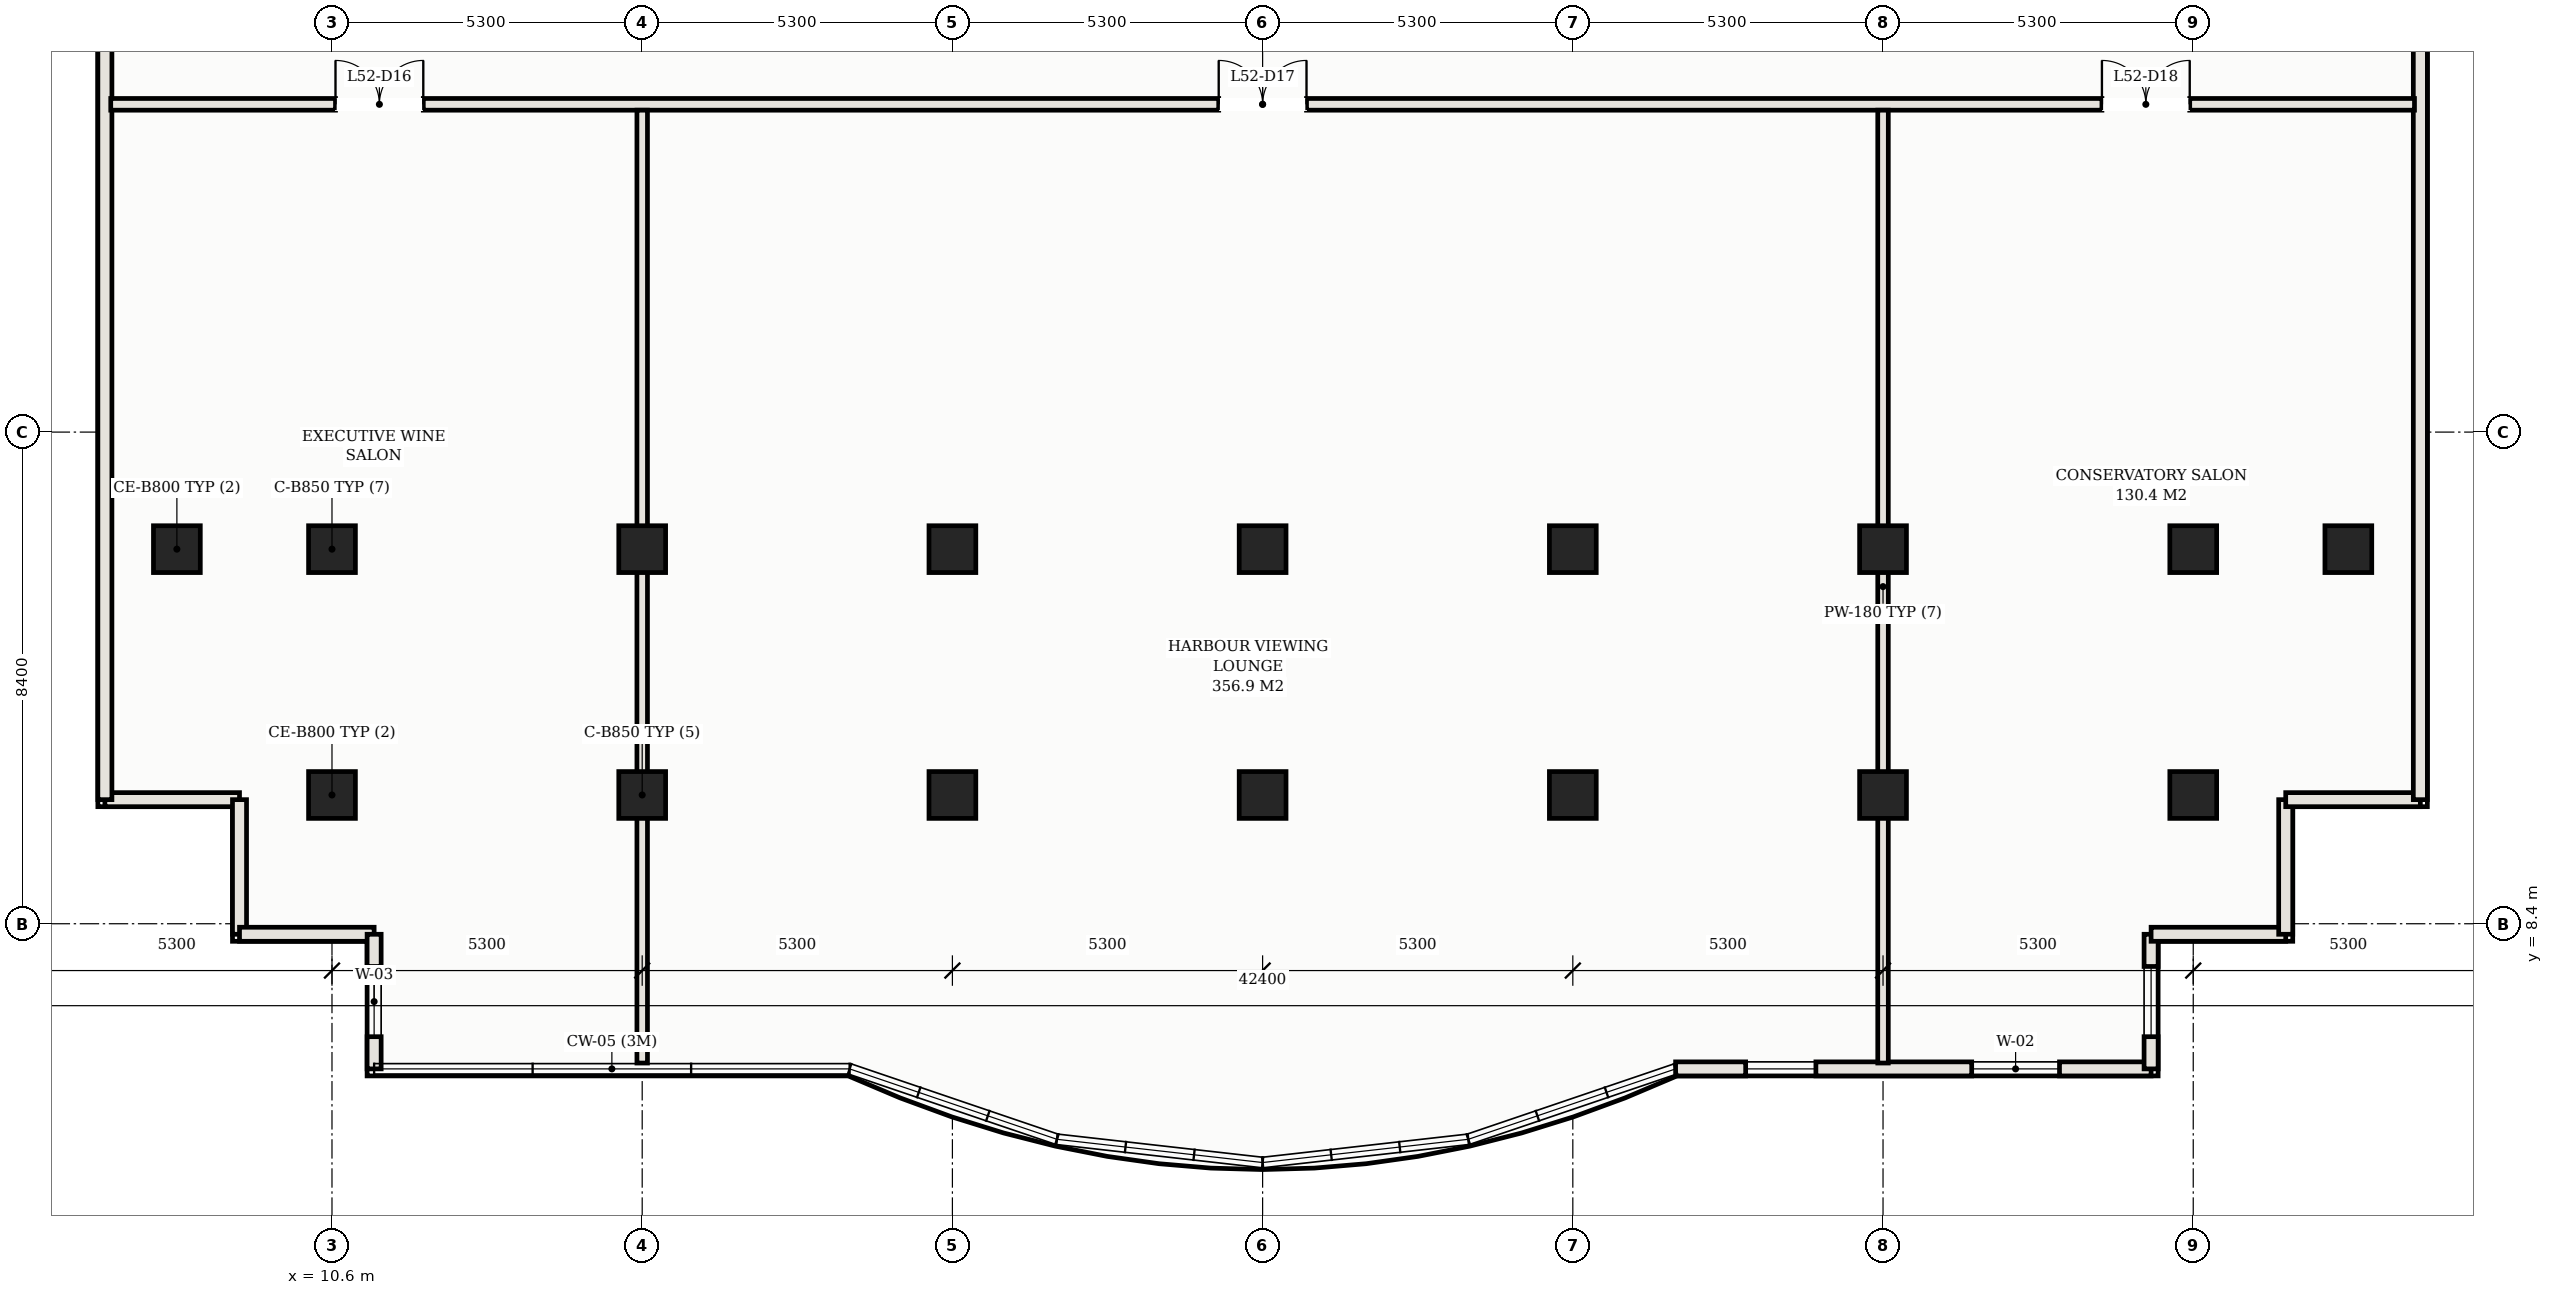
"""IFC4 building model, lengths in metres.
Left out: names, types, materials, properties, quantities, classifications, styles, units other than length and angle.
Written with IfcOpenShell. Run it as: python <this file> out.ifc"""

import sys

from ifc_helpers import new_model, si_unit, direction, frame, frame_2d, origin, origin_2d, place, context, subcontext, project, spatial, rectangle, hollow_rectangle, extrude, element, fill, save


model = new_model("IFC4")
c1 = context("Model", 3, precision=1e-05, world=origin(), true_north=direction((0.0, 1.0)))
c2 = subcontext(c1, "Body", "Model", "MODEL_VIEW")
j1 = project(units=[si_unit("LENGTHUNIT", "METRE"), si_unit("PLANEANGLEUNIT", "RADIAN")], contexts=[c1])
p1 = place(None, origin())
s1 = spatial("IfcSite", under=j1, at=p1, CompositionType="ELEMENT")
p2 = place(p1, origin())
s2 = spatial("IfcBuilding", under=s1, at=p2, CompositionType="ELEMENT")
p3 = place(p2, frame((0.0, 0.0, 192.2)))
s3 = spatial("IfcBuildingStorey", under=s2, at=p3, CompositionType="ELEMENT", Elevation=192.2)
for number, where, z_axis, x_axis in (
    (1, (10.6, 14.8, 0.0), (0.0, 0.0, 1.0), (1.0, 0.0, 0.0)),
    (2, (10.6, 10.6, 0.0), (0.0, 0.0, 1.0), (1.0, 0.0, 0.0)),
    (3, (15.9, 14.8, 0.0), (0.0, 0.0, 1.0), (1.0, 0.0, 0.0)),
    (4, (15.9, 10.6, 0.0), (0.0, 0.0, 1.0), (1.0, 0.0, 0.0)),
    (5, (21.2, 14.8, 0.0), (0.0, 0.0, 1.0), (1.0, 0.0, 0.0)),
    (6, (21.2, 10.6, 0.0), (0.0, 0.0, 1.0), (1.0, 0.0, 0.0)),
    (7, (26.5, 14.8, 0.0), (0.0, 0.0, 1.0), (1.0, 0.0, 0.0)),
    (8, (26.5, 10.6, 0.0), (0.0, 0.0, 1.0), (1.0, 0.0, 0.0)),
    (9, (31.8, 14.8, 0.0), (0.0, 0.0, 1.0), (1.0, 0.0, 0.0)),
    (10, (31.8, 10.6, 0.0), (0.0, 0.0, 1.0), (1.0, 0.0, 0.0)),
    (11, (37.1, 14.8, 0.0), (0.0, 0.0, 1.0), (1.0, 0.0, 0.0)),
    (12, (37.1, 10.6, 0.0), (0.0, 0.0, 1.0), (1.0, 0.0, 0.0)),
    (13, (42.4, 14.8, 0.0), (0.0, 0.0, 1.0), (1.0, 0.0, 0.0)),
    (14, (42.4, 10.6, 0.0), (0.0, 0.0, 1.0), (1.0, 0.0, 0.0)),
    (15, (7.95, 14.8, 0.0), (0.0, 0.0, 1.0), (1.0, 0.0, 0.0)),
    (16, (45.05, 14.8, 0.0), (0.0, 0.0, 1.0), (1.0, 0.0, 0.0)),
):
    element("IfcColumn", number, at=place(p3, frame(where, z_axis=z_axis, x_axis=x_axis)), inside=s3, PredefinedType="COLUMN", context=c2, shape_type="SweptSolid", body=[
        extrude(hollow_rectangle(XDim=0.8, YDim=0.8, WallThickness=0.028, at=origin_2d()), origin(), (0.0, 0.0, 1.0), 4.5),
    ])
for number, where, z_axis, x_axis in (
    (17, (6.72, 10.52, 0.0), (0.0, 0.0, 1.0), (1.0, 0.0, 0.0)),
    (18, (9.02, 10.52, 0.0), (0.0, 0.0, 1.0), (0.0, -1.0, 0.0)),
    (19, (9.02, 8.22, 0.0), (0.0, 0.0, 1.0), (1.0, 0.0, 0.0)),
):
    element("IfcWall", number, at=place(p3, frame(where, z_axis=z_axis, x_axis=x_axis)), inside=s3, PredefinedType="SOLIDWALL", context=c2, shape_type="SweptSolid", body=[
        extrude(rectangle(XDim=2.3, YDim=0.24, at=frame_2d((1.15, 0.0))), origin(), (0.0, 0.0, 1.0), 4.31),
    ])
p4 = place(p3, frame((11.32, 8.22, 0.0), z_axis=(0.0, 0.0, 1.0), x_axis=(0.0, -1.0, 0.0)))
e20 = element("IfcWall", 20, at=p4, inside=s3, PredefinedType="SOLIDWALL", context=c2, shape_type="SweptSolid", body=[
    extrude(rectangle(XDim=2.3, YDim=0.24, at=frame_2d((1.15, 0.0))), origin(), (0.0, 0.0, 1.0), 4.31),
])
p5 = place(p4, frame((0.55, 0.0, 0.75)))
e21 = element("IfcOpeningElement", 21, at=p5, cuts=e20, PredefinedType="OPENING", context=c2, shape_type="SweptSolid", body=[
    extrude(rectangle(XDim=1.2, YDim=1.5, at=frame_2d((0.6, 0.75))), frame((0.0, 0.13, 0.0), z_axis=(0.0, -1.0, 0.0), x_axis=(1.0, 0.0, 0.0)), (0.0, 0.0, 1.0), 0.26),
])
p6 = place(p3, frame((33.556, 5.92, 0.0), z_axis=(0.0, 0.0, 1.0), x_axis=(1.0, 0.0, 0.0)))
e22 = element("IfcWall", 22, at=p6, inside=s3, PredefinedType="SOLIDWALL", context=c2, shape_type="SweptSolid", body=[
    extrude(rectangle(XDim=8.124, YDim=0.24, at=frame_2d((4.062, 0.0))), origin(), (0.0, 0.0, 1.0), 4.31),
])
p7 = place(p6, frame((5.059, 0.0, 0.75)))
e23 = element("IfcOpeningElement", 23, at=p7, cuts=e22, PredefinedType="OPENING", context=c2, shape_type="SweptSolid", body=[
    extrude(rectangle(XDim=1.5, YDim=1.6, at=frame_2d((0.75, 0.8))), frame((0.0, 0.13, 0.0), z_axis=(0.0, -1.0, 0.0), x_axis=(1.0, 0.0, 0.0)), (0.0, 0.0, 1.0), 0.26),
])
p8 = place(p6, frame((1.197, 0.0, 0.75)))
e24 = element("IfcOpeningElement", 24, at=p8, cuts=e22, PredefinedType="OPENING", context=c2, shape_type="SweptSolid", body=[
    extrude(rectangle(XDim=1.2, YDim=1.5, at=frame_2d((0.6, 0.75))), frame((0.0, 0.13, 0.0), z_axis=(0.0, -1.0, 0.0), x_axis=(1.0, 0.0, 0.0)), (0.0, 0.0, 1.0), 0.26),
])
p9 = place(p3, frame((41.68, 5.92, 0.0), z_axis=(0.0, 0.0, 1.0), x_axis=(0.0, 1.0, 0.0)))
e25 = element("IfcWall", 25, at=p9, inside=s3, PredefinedType="SOLIDWALL", context=c2, shape_type="SweptSolid", body=[
    extrude(rectangle(XDim=2.3, YDim=0.24, at=frame_2d((1.15, 0.0))), origin(), (0.0, 0.0, 1.0), 4.31),
])
p10 = place(p9, frame((0.55, 0.0, 0.75)))
e26 = element("IfcOpeningElement", 26, at=p10, cuts=e25, PredefinedType="OPENING", context=c2, shape_type="SweptSolid", body=[
    extrude(rectangle(XDim=1.2, YDim=1.5, at=frame_2d((0.6, 0.75))), frame((0.0, 0.13, 0.0), z_axis=(0.0, -1.0, 0.0), x_axis=(1.0, 0.0, 0.0)), (0.0, 0.0, 1.0), 0.26),
])
for number, where, z_axis, x_axis in (
    (27, (41.68, 8.22, 0.0), (0.0, 0.0, 1.0), (1.0, 0.0, 0.0)),
    (28, (43.98, 8.22, 0.0), (0.0, 0.0, 1.0), (0.0, 1.0, 0.0)),
    (29, (43.98, 10.52, 0.0), (0.0, 0.0, 1.0), (1.0, 0.0, 0.0)),
):
    element("IfcWall", number, at=place(p3, frame(where, z_axis=z_axis, x_axis=x_axis)), inside=s3, PredefinedType="SOLIDWALL", context=c2, shape_type="SweptSolid", body=[
        extrude(rectangle(XDim=2.3, YDim=0.24, at=frame_2d((1.15, 0.0))), origin(), (0.0, 0.0, 1.0), 4.31),
    ])
for number, where, z_axis, x_axis in (
    (30, (46.28, 10.52, 0.0), (0.0, 0.0, 1.0), (0.0, 1.0, 0.0)),
    (31, (6.72, 36.93, 0.0), (0.0, 0.0, 1.0), (0.0, -1.0, 0.0)),
):
    element("IfcWall", number, at=place(p3, frame(where, z_axis=z_axis, x_axis=x_axis)), inside=s3, PredefinedType="SOLIDWALL", context=c2, shape_type="SweptSolid", body=[
        extrude(rectangle(XDim=26.41, YDim=0.24, at=frame_2d((13.205, 0.0))), origin(), (0.0, 0.0, 1.0), 4.31),
    ])
p11 = place(p3, frame((6.82, 22.4, 0.0), z_axis=(0.0, 0.0, 1.0), x_axis=(1.0, 0.0, 0.0)))
e32 = element("IfcWall", 32, at=p11, inside=s3, PredefinedType="PARTITIONING", context=c2, shape_type="SweptSolid", body=[
    extrude(rectangle(XDim=39.36, YDim=0.2, at=frame_2d((19.68, 0.0))), origin(), (0.0, 0.0, 1.0), 4.31),
])
p12 = place(p11, frame((3.84, 0.0, 0.0)))
e33 = element("IfcOpeningElement", 33, at=p12, cuts=e32, PredefinedType="OPENING", context=c2, shape_type="SweptSolid", body=[
    extrude(rectangle(XDim=1.5, YDim=2.25, at=frame_2d((0.75, 1.125))), frame((0.0, 0.11, 0.0), z_axis=(0.0, -1.0, 0.0), x_axis=(1.0, 0.0, 0.0)), (0.0, 0.0, 1.0), 0.22),
])
p13 = place(p11, frame((18.93, 0.0, 0.0)))
e34 = element("IfcOpeningElement", 34, at=p13, cuts=e32, PredefinedType="OPENING", context=c2, shape_type="SweptSolid", body=[
    extrude(rectangle(XDim=1.5, YDim=2.25, at=frame_2d((0.75, 1.125))), frame((0.0, 0.11, 0.0), z_axis=(0.0, -1.0, 0.0), x_axis=(1.0, 0.0, 0.0)), (0.0, 0.0, 1.0), 0.22),
])
p14 = place(p11, frame((34.02, 0.0, 0.0)))
e35 = element("IfcOpeningElement", 35, at=p14, cuts=e32, PredefinedType="OPENING", context=c2, shape_type="SweptSolid", body=[
    extrude(rectangle(XDim=1.5, YDim=2.25, at=frame_2d((0.75, 1.125))), frame((0.0, 0.11, 0.0), z_axis=(0.0, -1.0, 0.0), x_axis=(1.0, 0.0, 0.0)), (0.0, 0.0, 1.0), 0.22),
])
for number, where, z_axis, x_axis in (
    (36, (15.9, 6.02, 0.0), (0.0, 0.0, 1.0), (0.0, 1.0, 0.0)),
    (37, (37.1, 6.02, 0.0), (0.0, 0.0, 1.0), (0.0, 1.0, 0.0)),
):
    element("IfcWall", number, at=place(p3, frame(where, z_axis=z_axis, x_axis=x_axis)), inside=s3, PredefinedType="PARTITIONING", context=c2, shape_type="SweptSolid", body=[
        extrude(rectangle(XDim=16.28, YDim=0.18, at=frame_2d((8.14, 0.0))), origin(), (0.0, 0.0, 1.0), 3.655),
    ])
p15 = place(p5, origin())
e38 = element("IfcWindow", 38, at=p15, inside=s3, PartitioningType="SINGLE_PANEL", PredefinedType="WINDOW", context=c2, shape_type="SweptSolid", body=[
    extrude(rectangle(XDim=1.2, YDim=1.5, at=frame_2d((0.6, 0.75))), frame((0.0, 0.03, 0.0), z_axis=(0.0, -1.0, 0.0), x_axis=(1.0, 0.0, 0.0)), (0.0, 0.0, 1.0), 0.06),
])
fill(e21, e38)
p16 = place(p7, origin())
e39 = element("IfcWindow", 39, at=p16, inside=s3, PartitioningType="SINGLE_PANEL", PredefinedType="WINDOW", context=c2, shape_type="SweptSolid", body=[
    extrude(rectangle(XDim=1.5, YDim=1.6, at=frame_2d((0.75, 0.8))), frame((0.0, 0.03, 0.0), z_axis=(0.0, -1.0, 0.0), x_axis=(1.0, 0.0, 0.0)), (0.0, 0.0, 1.0), 0.06),
])
fill(e23, e39)
p17 = place(p10, origin())
e40 = element("IfcWindow", 40, at=p17, inside=s3, PartitioningType="SINGLE_PANEL", PredefinedType="WINDOW", context=c2, shape_type="SweptSolid", body=[
    extrude(rectangle(XDim=1.2, YDim=1.5, at=frame_2d((0.6, 0.75))), frame((0.0, 0.03, 0.0), z_axis=(0.0, -1.0, 0.0), x_axis=(1.0, 0.0, 0.0)), (0.0, 0.0, 1.0), 0.06),
])
fill(e26, e40)
p18 = place(p12, origin())
e41 = element("IfcDoor", 41, at=p18, inside=s3, OperationType="DOUBLE_DOOR_SINGLE_SWING", PredefinedType="DOOR", context=c2, shape_type="SweptSolid", body=[
    extrude(rectangle(XDim=1.5, YDim=2.25, at=frame_2d((0.75, 1.125))), frame((0.0, 0.025, 0.0), z_axis=(0.0, -1.0, 0.0), x_axis=(1.0, 0.0, 0.0)), (0.0, 0.0, 1.0), 0.05),
])
fill(e33, e41)
p19 = place(p13, origin())
e42 = element("IfcDoor", 42, at=p19, inside=s3, OperationType="DOUBLE_DOOR_SINGLE_SWING", PredefinedType="DOOR", context=c2, shape_type="SweptSolid", body=[
    extrude(rectangle(XDim=1.5, YDim=2.25, at=frame_2d((0.75, 1.125))), frame((0.0, 0.025, 0.0), z_axis=(0.0, -1.0, 0.0), x_axis=(1.0, 0.0, 0.0)), (0.0, 0.0, 1.0), 0.05),
])
fill(e34, e42)
p20 = place(p14, origin())
e43 = element("IfcDoor", 43, at=p20, inside=s3, OperationType="DOUBLE_DOOR_SINGLE_SWING", PredefinedType="DOOR", context=c2, shape_type="SweptSolid", body=[
    extrude(rectangle(XDim=1.5, YDim=2.25, at=frame_2d((0.75, 1.125))), frame((0.0, 0.025, 0.0), z_axis=(0.0, -1.0, 0.0), x_axis=(1.0, 0.0, 0.0)), (0.0, 0.0, 1.0), 0.05),
])
fill(e35, e43)
p21 = place(p8, origin())
e44 = element("IfcWindow", 44, at=p21, inside=s3, PartitioningType="SINGLE_PANEL", PredefinedType="WINDOW", context=c2, shape_type="SweptSolid", body=[
    extrude(rectangle(XDim=1.2, YDim=1.5, at=frame_2d((0.6, 0.75))), frame((0.0, 0.03, 0.0), z_axis=(0.0, -1.0, 0.0), x_axis=(1.0, 0.0, 0.0)), (0.0, 0.0, 1.0), 0.06),
])
fill(e24, e44)
save(model, sys.argv[1])
